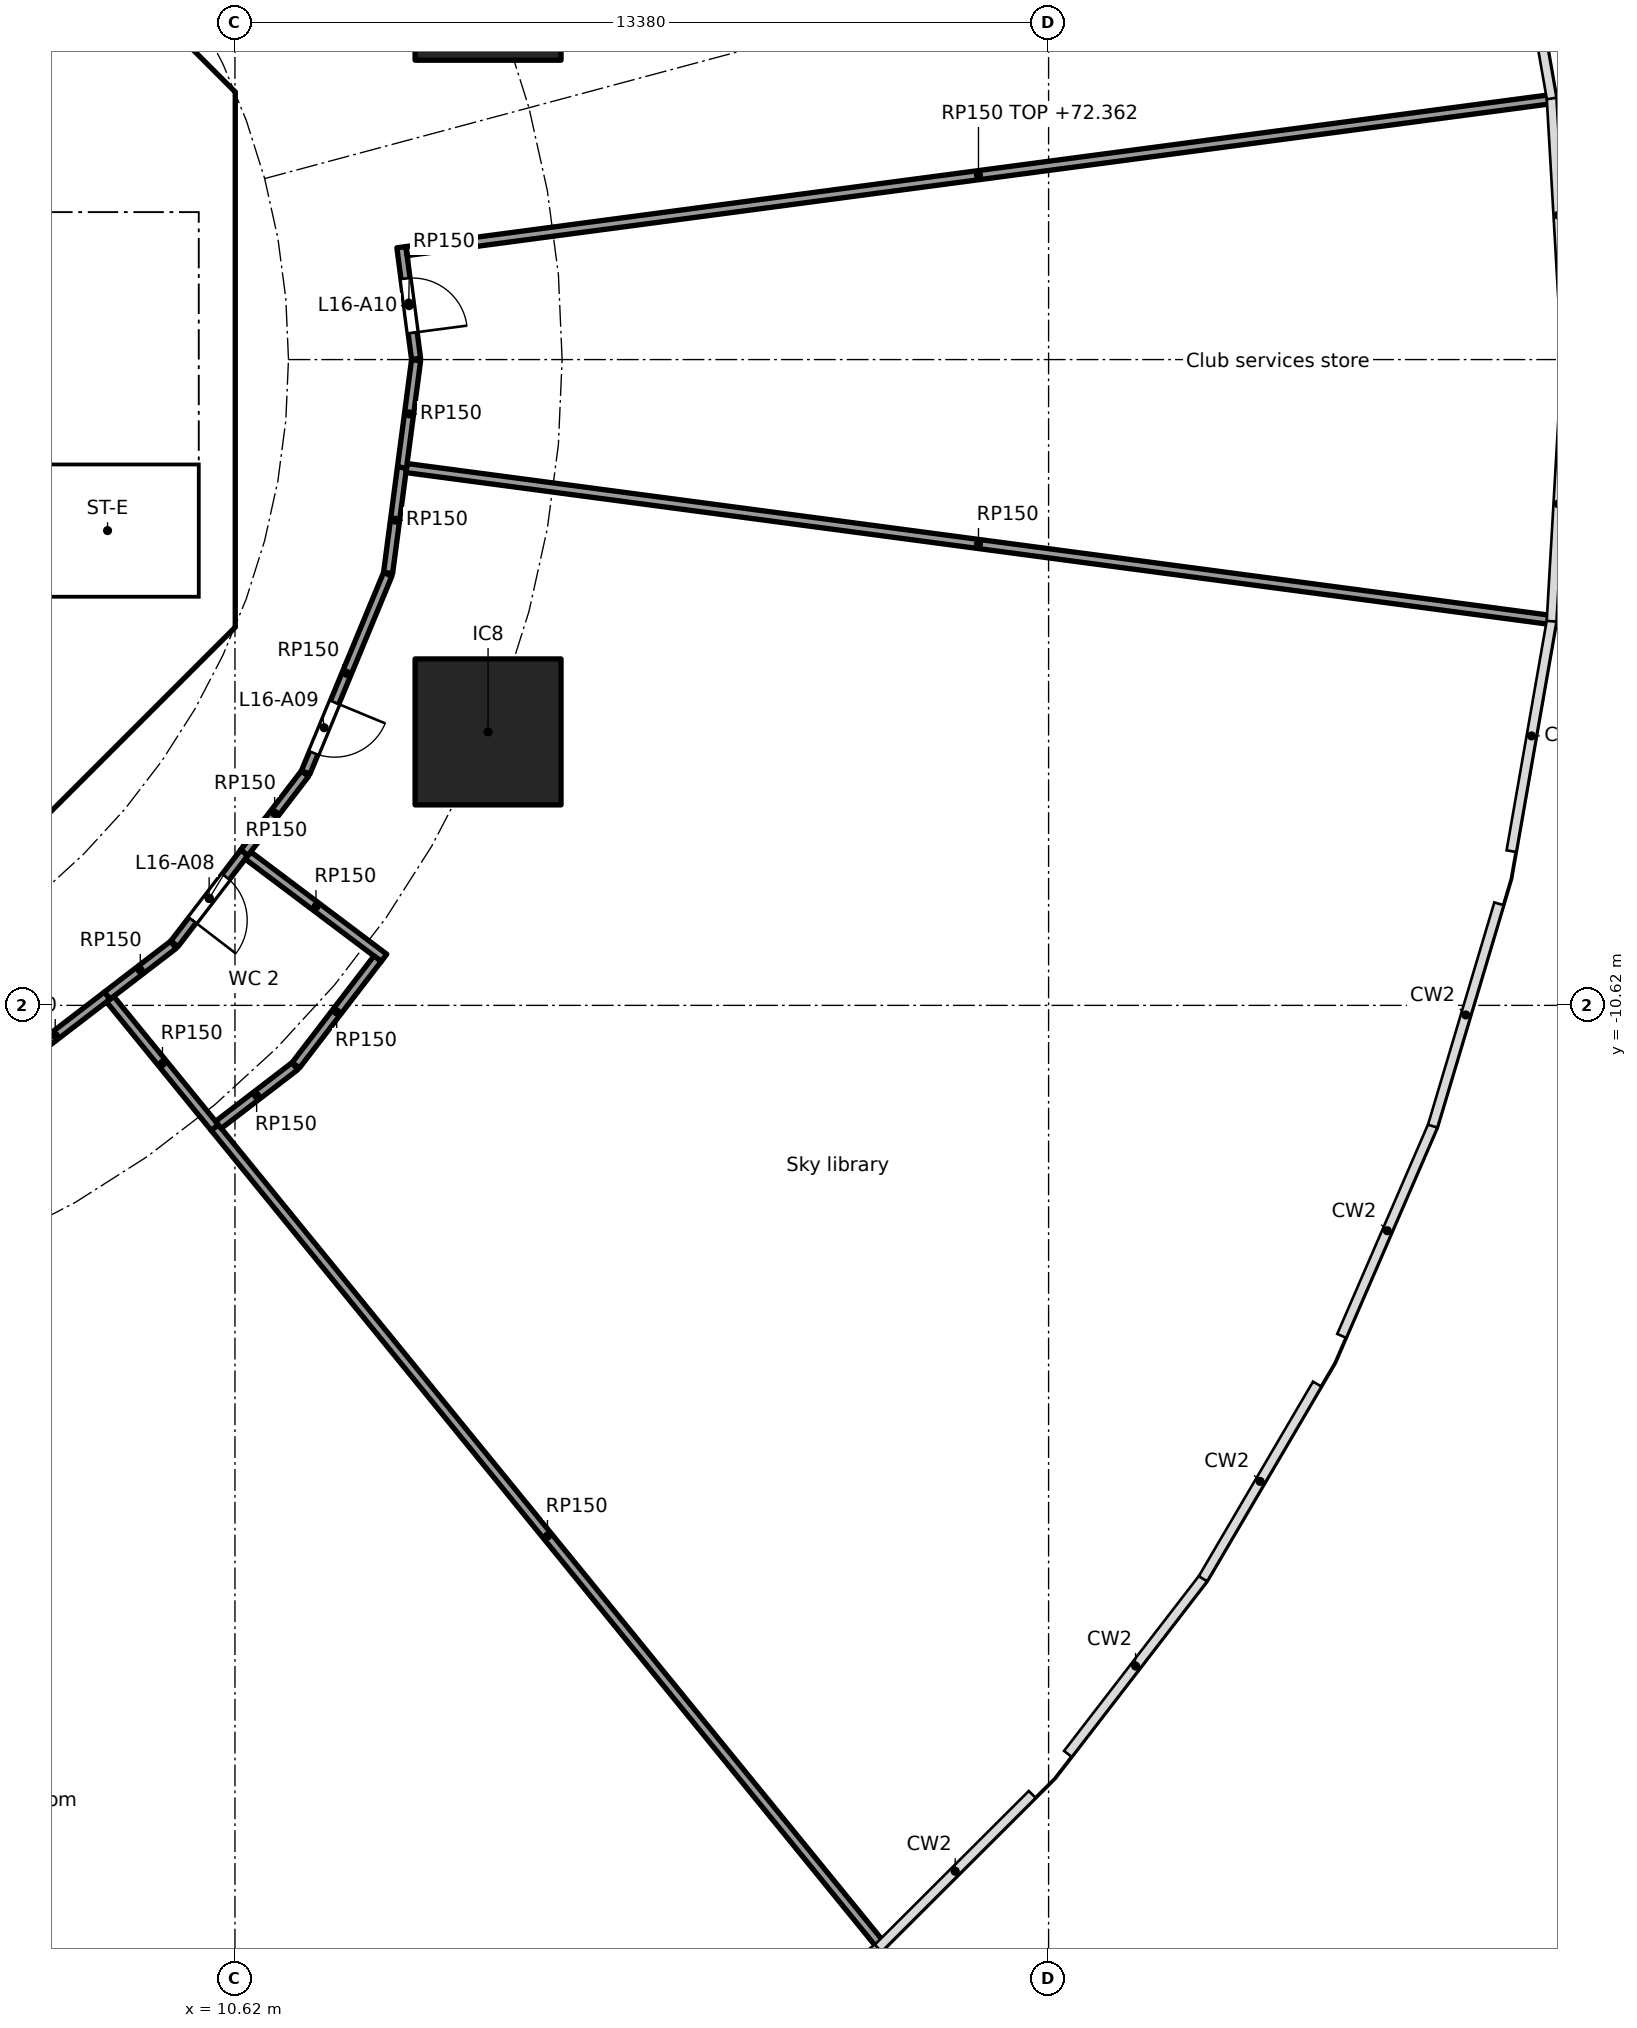
"""IFC4 building model, lengths in metres.
Left out: names, types, materials, properties, quantities, classifications, styles, units other than length and angle.
Written with IfcOpenShell. Run it as: python <this file> out.ifc"""

import sys

from ifc_helpers import new_model, si_unit, direction, frame, frame_2d, origin, origin_2d, place, context, subcontext, project, spatial, polyline, rectangle, outline, extrude, element, fill, save


model = new_model("IFC4")
c1 = context("Model", 3, precision=1e-05, world=origin(), true_north=direction((0.0, 1.0)))
c2 = subcontext(c1, "Body", "Model", "MODEL_VIEW")
j1 = project(units=[si_unit("LENGTHUNIT", "METRE"), si_unit("PLANEANGLEUNIT", "RADIAN")], contexts=[c1])
p1 = place(None, origin())
s1 = spatial("IfcSite", under=j1, at=p1, CompositionType="ELEMENT")
p2 = place(p1, origin())
s2 = spatial("IfcBuilding", under=s1, at=p2, CompositionType="ELEMENT")
p3 = place(p2, frame((0.0, 0.0, 67.7)))
s3 = spatial("IfcBuildingStorey", under=s2, at=p3, CompositionType="ELEMENT", Elevation=67.7)
for number, where, z_axis, x_axis in (
    (1, (14.782, 6.123, 0.0), (0.0, 0.0, 1.0), (1.0, 0.0, 0.0)),
    (2, (14.782, -6.123, 0.0), (0.0, 0.0, 1.0), (1.0, 0.0, 0.0)),
):
    element("IfcColumn", number, at=place(p3, frame(where, z_axis=z_axis, x_axis=x_axis)), inside=s3, PredefinedType="COLUMN", context=c2, shape_type="SweptSolid", body=[
        extrude(rectangle(XDim=2.4, YDim=2.4, at=origin_2d()), origin(), (0.0, 0.0, 1.0), 5.6),
    ])
p4 = place(p3, frame((9.988, 4.613, 0.0), z_axis=(0.0, 0.0, 1.0), x_axis=(-0.707106781187, 0.707106781187, 0.0)))
e3 = element("IfcWall", 3, at=p4, inside=s3, PredefinedType="SHEAR", context=c2, shape_type="SweptSolid", body=[
    extrude(rectangle(XDim=7.602, YDim=0.6, at=frame_2d((3.801, 0.0))), origin(), (0.0, 0.0, 1.0), 5.34),
])
p5 = place(p4, frame((3.201, 0.0, 0.0)))
e4 = element("IfcOpeningElement", 4, at=p5, cuts=e3, PredefinedType="OPENING", context=c2, shape_type="SweptSolid", body=[
    extrude(rectangle(XDim=1.2, YDim=2.1, at=frame_2d((0.6, 1.05))), frame((0.0, 0.31, 0.0), z_axis=(0.0, -1.0, 0.0), x_axis=(1.0, 0.0, 0.0)), (0.0, 0.0, 1.0), 0.62),
])
p6 = place(p3, frame((4.613, -9.988, 0.0), z_axis=(0.0, 0.0, 1.0), x_axis=(0.707106781187, 0.707106781187, 0.0)))
e5 = element("IfcWall", 5, at=p6, inside=s3, PredefinedType="SHEAR", context=c2, shape_type="SweptSolid", body=[
    extrude(rectangle(XDim=7.602, YDim=0.6, at=frame_2d((3.801, 0.0))), origin(), (0.0, 0.0, 1.0), 5.34),
])
p7 = place(p6, frame((3.201, 0.0, 0.0)))
e6 = element("IfcOpeningElement", 6, at=p7, cuts=e5, PredefinedType="OPENING", context=c2, shape_type="SweptSolid", body=[
    extrude(rectangle(XDim=1.2, YDim=2.1, at=frame_2d((0.6, 1.05))), frame((0.0, 0.31, 0.0), z_axis=(0.0, -1.0, 0.0), x_axis=(1.0, 0.0, 0.0)), (0.0, 0.0, 1.0), 0.62),
])
p8 = place(p3, frame((6.7, 4.0, 0.0), z_axis=(0.0, 0.0, 1.0), x_axis=(1.0, 0.0, 0.0)))
e7 = element("IfcWall", 7, at=p8, inside=s3, PredefinedType="SOLIDWALL", context=c2, shape_type="SweptSolid", body=[
    extrude(rectangle(XDim=3.325, YDim=0.2, at=frame_2d((1.662, 0.0))), origin(), (0.0, 0.0, 1.0), 5.34),
])
p9 = place(p8, frame((1.25, 0.0, 0.0)))
e8 = element("IfcOpeningElement", 8, at=p9, cuts=e7, PredefinedType="OPENING", context=c2, shape_type="SweptSolid", body=[
    extrude(rectangle(XDim=1.1, YDim=2.1, at=frame_2d((0.55, 1.05))), frame((0.0, 0.11, 0.0), z_axis=(0.0, -1.0, 0.0), x_axis=(1.0, 0.0, 0.0)), (0.0, 0.0, 1.0), 0.22),
])
p10 = place(p3, origin())
e9 = element("IfcWall", 9, at=p10, inside=s3, PredefinedType="SHEAR", context=c2, shape_type="SweptSolid", body=[
    extrude(outline(polyline([(9.776, -4.401), (10.025, -4.152), (10.025, -3.801), (10.025, 4.152), (9.776, 4.401), (10.2, 4.825), (10.625, 4.401), (10.625, -4.401), (10.2, -4.825), (9.776, -4.401)])), origin(), (0.0, 0.0, 1.0), 5.34),
])
p11 = place(p3, origin())
e10 = element("IfcWall", 10, at=p11, inside=s3, PredefinedType="SOLIDWALL", context=c2, shape_type="SweptSolid", body=[
    extrude(outline(polyline([(10.025, -4.1), (6.7, -4.1), (6.7, -3.9), (10.025, -3.9), (10.025, -4.1)])), origin(), (0.0, 0.0, 1.0), 5.34),
])
p12 = place(p3, frame((8.519, -10.459, 0.0), z_axis=(0.0, 0.0, 1.0), x_axis=(-0.793372937326, -0.608735888805, 0.0)))
e11 = element("IfcWall", 11, at=p12, inside=s3, PredefinedType="PARTITIONING", context=c2, shape_type="SweptSolid", body=[
    extrude(rectangle(XDim=2.155, YDim=0.15, at=frame_2d((1.078, 0.0))), origin(), (0.0, 0.0, 1.0), 5.34),
])
p13 = place(p3, frame((8.567, -10.517, 0.0), z_axis=(0.0, 0.0, 1.0), x_axis=(0.631573271363, -0.775316195432, 0.0)))
e12 = element("IfcWall", 12, at=p13, inside=s3, PredefinedType="PARTITIONING", context=c2, shape_type="SweptSolid", body=[
    extrude(rectangle(XDim=2.726, YDim=0.15, at=frame_2d((1.363, 0.0))), origin(), (0.0, 0.0, 1.0), 5.34),
])
p14 = place(p3, frame((9.607, -9.624, 0.0), z_axis=(0.0, 0.0, 1.0), x_axis=(-0.793371316762, -0.6087380009, 0.0)))
e13 = element("IfcWall", 13, at=p14, inside=s3, PredefinedType="PARTITIONING", context=c2, shape_type="SweptSolid", body=[
    extrude(rectangle(XDim=1.371, YDim=0.15, at=frame_2d((0.686, 0.0))), origin(), (0.0, 0.0, 1.0), 5.34),
])
p15 = place(p3, frame((10.288, -12.631, 0.0), z_axis=(0.0, 0.0, 1.0), x_axis=(0.631546535922, -0.77533797338, 0.0)))
e14 = element("IfcWall", 14, at=p15, inside=s3, PredefinedType="PARTITIONING", context=c2, shape_type="SweptSolid", body=[
    extrude(rectangle(XDim=17.325, YDim=0.15, at=frame_2d((8.663, 0.0))), origin(), (0.0, 0.0, 1.0), 5.34),
])
p16 = place(p3, frame((10.774, -8.109, 0.0), z_axis=(0.0, 0.0, 1.0), x_axis=(-0.608754453805, -0.793358692504, 0.0)))
e15 = element("IfcWall", 15, at=p16, inside=s3, PredefinedType="PARTITIONING", context=c2, shape_type="SweptSolid", body=[
    extrude(rectangle(XDim=1.888, YDim=0.15, at=frame_2d((0.944, 0.0))), origin(), (0.0, 0.0, 1.0), 5.34),
])
p17 = place(p16, frame((0.5, 0.0, 0.0)))
e16 = element("IfcOpeningElement", 16, at=p17, cuts=e15, PredefinedType="OPENING", context=c2, shape_type="SweptSolid", body=[
    extrude(rectangle(XDim=0.9, YDim=2.1, at=frame_2d((0.45, 1.05))), frame((0.0, 0.085, 0.0), z_axis=(0.0, -1.0, 0.0), x_axis=(1.0, 0.0, 0.0)), (0.0, 0.0, 1.0), 0.17),
])
p18 = place(p3, frame((10.833, -8.154, 0.0), z_axis=(0.0, 0.0, 1.0), x_axis=(0.798994468734, -0.601338373075, 0.0)))
e17 = element("IfcWall", 17, at=p18, inside=s3, PredefinedType="PARTITIONING", context=c2, shape_type="SweptSolid", body=[
    extrude(rectangle(XDim=2.8, YDim=0.15, at=frame_2d((1.4, 0.0))), origin(), (0.0, 0.0, 1.0), 5.34),
])
p19 = place(p3, frame((11.604, -11.621, 0.0), z_axis=(0.0, 0.0, 1.0), x_axis=(-0.793328373205, -0.608793965368, 0.0)))
e18 = element("IfcWall", 18, at=p19, inside=s3, PredefinedType="PARTITIONING", context=c2, shape_type="SweptSolid", body=[
    extrude(rectangle(XDim=1.584, YDim=0.15, at=frame_2d((0.792, 0.0))), origin(), (0.0, 0.0, 1.0), 5.34),
])
p20 = place(p3, frame((11.771, -6.809, 0.0), z_axis=(0.0, 0.0, 1.0), x_axis=(-0.608716251771, -0.793388003961, 0.0)))
e19 = element("IfcWall", 19, at=p20, inside=s3, PredefinedType="PARTITIONING", context=c2, shape_type="SweptSolid", body=[
    extrude(rectangle(XDim=1.638, YDim=0.15, at=frame_2d((0.819, 0.0))), origin(), (0.0, 0.0, 1.0), 5.34),
])
p21 = place(p3, frame((12.965, -9.852, 0.0), z_axis=(0.0, 0.0, 1.0), x_axis=(-0.608737875962, -0.793371412624, 0.0)))
e20 = element("IfcWall", 20, at=p21, inside=s3, PredefinedType="PARTITIONING", context=c2, shape_type="SweptSolid", body=[
    extrude(rectangle(XDim=2.208, YDim=0.15, at=frame_2d((1.104, 0.0))), origin(), (0.0, 0.0, 1.0), 5.34),
])
p22 = place(p3, frame((13.132, -3.531, 0.0), z_axis=(0.0, 0.0, 1.0), x_axis=(-0.382677866108, -0.923881838111, 0.0)))
e21 = element("IfcWall", 21, at=p22, inside=s3, PredefinedType="PARTITIONING", context=c2, shape_type="SweptSolid", body=[
    extrude(rectangle(XDim=3.527, YDim=0.15, at=frame_2d((1.763, 0.0))), origin(), (0.0, 0.0, 1.0), 5.34),
])
p23 = place(p22, frame((2.281, 0.0, 0.0)))
e22 = element("IfcOpeningElement", 22, at=p23, cuts=e21, PredefinedType="OPENING", context=c2, shape_type="SweptSolid", body=[
    extrude(rectangle(XDim=0.9, YDim=2.1, at=frame_2d((0.45, 1.05))), frame((0.0, 0.085, 0.0), z_axis=(0.0, -1.0, 0.0), x_axis=(1.0, 0.0, 0.0)), (0.0, 0.0, 1.0), 0.17),
])
p24 = place(p3, frame((13.366, -1.774, 0.0), z_axis=(0.0, 0.0, 1.0), x_axis=(-0.130526735914, -0.991444789795, 0.0)))
e23 = element("IfcWall", 23, at=p24, inside=s3, PredefinedType="PARTITIONING", context=c2, shape_type="SweptSolid", body=[
    extrude(rectangle(XDim=1.749, YDim=0.15, at=frame_2d((0.875, 0.0))), origin(), (0.0, 0.0, 1.0), 5.34),
])
p25 = place(p3, frame((13.441, -1.784, 0.0), z_axis=(0.0, 0.0, 1.0), x_axis=(0.991305479384, -0.131580570535, 0.0)))
e24 = element("IfcWall", 24, at=p25, inside=s3, PredefinedType="PARTITIONING", context=c2, shape_type="SweptSolid", body=[
    extrude(rectangle(XDim=18.978, YDim=0.15, at=frame_2d((9.489, 0.0))), origin(), (0.0, 0.0, 1.0), 5.34),
])
p26 = place(p3, frame((13.357, 1.848, 0.0), z_axis=(0.0, 0.0, 1.0), x_axis=(0.130471558159, -0.991452052553, 0.0)))
e25 = element("IfcWall", 25, at=p26, inside=s3, PredefinedType="PARTITIONING", context=c2, shape_type="SweptSolid", body=[
    extrude(rectangle(XDim=1.853, YDim=0.15, at=frame_2d((0.926, 0.0))), origin(), (0.0, 0.0, 1.0), 5.34),
])
p27 = place(p26, frame((0.52, 0.0, 0.0)))
e26 = element("IfcOpeningElement", 26, at=p27, cuts=e25, PredefinedType="OPENING", context=c2, shape_type="SweptSolid", body=[
    extrude(rectangle(XDim=0.9, YDim=2.1, at=frame_2d((0.45, 1.05))), frame((0.0, 0.085, 0.0), z_axis=(0.0, -1.0, 0.0), x_axis=(1.0, 0.0, 0.0)), (0.0, 0.0, 1.0), 0.17),
])
p28 = place(p3, frame((13.598, -0.012, 0.0), z_axis=(0.0, 0.0, 1.0), x_axis=(-0.130472275964, -0.991451958092, 0.0)))
e27 = element("IfcWall", 27, at=p28, inside=s3, PredefinedType="PARTITIONING", context=c2, shape_type="SweptSolid", body=[
    extrude(rectangle(XDim=1.778, YDim=0.15, at=frame_2d((0.889, 0.0))), origin(), (0.0, 0.0, 1.0), 5.34),
])
p29 = place(p3, frame((32.253, 4.281, 0.0), z_axis=(0.0, 0.0, 1.0), x_axis=(-0.991305479384, -0.131580570535, 0.0)))
e28 = element("IfcWall", 28, at=p29, inside=s3, PredefinedType="PARTITIONING", context=c2, shape_type="SweptSolid", body=[
    extrude(rectangle(XDim=18.978, YDim=0.15, at=frame_2d((9.489, 0.0))), origin(), (0.0, 0.0, 1.0), 4.662),
])
p30 = place(p9, frame((1.1, 0.0, 0.0), x_axis=(-1.0, 0.0, 0.0)))
e29 = element("IfcDoor", 29, at=p30, inside=s3, OperationType="SINGLE_SWING_LEFT", PredefinedType="DOOR", context=c2, shape_type="SweptSolid", body=[
    extrude(rectangle(XDim=1.1, YDim=2.1, at=frame_2d((0.55, 1.05))), frame((0.0, 0.025, 0.0), z_axis=(0.0, -1.0, 0.0), x_axis=(1.0, 0.0, 0.0)), (0.0, 0.0, 1.0), 0.05),
])
fill(e8, e29)
p31 = place(p7, origin())
e30 = element("IfcDoor", 30, at=p31, inside=s3, OperationType="SINGLE_SWING_LEFT", PredefinedType="DOOR", context=c2, shape_type="SweptSolid", body=[
    extrude(rectangle(XDim=1.2, YDim=2.1, at=frame_2d((0.6, 1.05))), frame((0.0, 0.025, 0.0), z_axis=(0.0, -1.0, 0.0), x_axis=(1.0, 0.0, 0.0)), (0.0, 0.0, 1.0), 0.05),
])
fill(e6, e30)
p32 = place(p17, origin())
e31 = element("IfcDoor", 31, at=p32, inside=s3, OperationType="SINGLE_SWING_RIGHT", PredefinedType="DOOR", context=c2, shape_type="SweptSolid", body=[
    extrude(rectangle(XDim=0.9, YDim=2.1, at=frame_2d((0.45, 1.05))), frame((0.0, 0.025, 0.0), z_axis=(0.0, -1.0, 0.0), x_axis=(1.0, 0.0, 0.0)), (0.0, 0.0, 1.0), 0.05),
])
fill(e16, e31)
p33 = place(p23, origin())
e32 = element("IfcDoor", 32, at=p33, inside=s3, OperationType="SINGLE_SWING_LEFT", PredefinedType="DOOR", context=c2, shape_type="SweptSolid", body=[
    extrude(rectangle(XDim=0.9, YDim=2.1, at=frame_2d((0.45, 1.05))), frame((0.0, 0.025, 0.0), z_axis=(0.0, -1.0, 0.0), x_axis=(1.0, 0.0, 0.0)), (0.0, 0.0, 1.0), 0.05),
])
fill(e22, e32)
p34 = place(p27, origin())
e33 = element("IfcDoor", 33, at=p34, inside=s3, OperationType="SINGLE_SWING_RIGHT", PredefinedType="DOOR", context=c2, shape_type="SweptSolid", body=[
    extrude(rectangle(XDim=0.9, YDim=2.1, at=frame_2d((0.45, 1.05))), frame((0.0, 0.025, 0.0), z_axis=(0.0, -1.0, 0.0), x_axis=(1.0, 0.0, 0.0)), (0.0, 0.0, 1.0), 0.05),
])
fill(e26, e33)
save(model, sys.argv[1])
